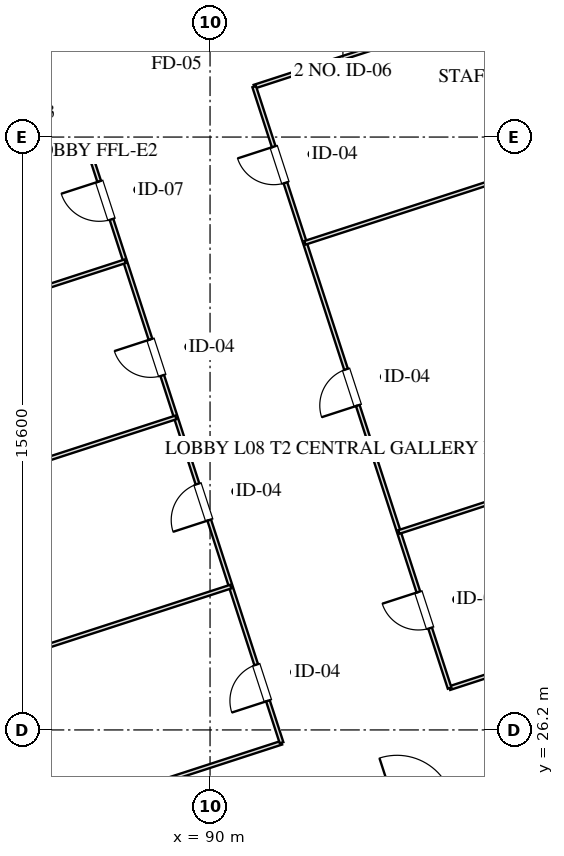
"""IFC4 building model, lengths in metres.
Left out: names, types, materials, properties, quantities, classifications, styles, units other than length and angle.
Written with IfcOpenShell. Run it as: python <this file> out.ifc"""

import sys

from ifc_helpers import new_model, si_unit, direction, frame, frame_2d, origin, place, context, subcontext, project, spatial, rectangle, extrude, element, fill, save


model = new_model("IFC4")
c1 = context("Model", 3, precision=1e-05, world=origin(), true_north=direction((0.0, 1.0)))
c2 = subcontext(c1, "Body", "Model", "MODEL_VIEW")
j1 = project(units=[si_unit("LENGTHUNIT", "METRE"), si_unit("PLANEANGLEUNIT", "RADIAN")], contexts=[c1])
p1 = place(None, origin())
s1 = spatial("IfcSite", under=j1, at=p1, CompositionType="ELEMENT")
p2 = place(p1, origin())
s2 = spatial("IfcBuilding", under=s1, at=p2, CompositionType="ELEMENT")
p3 = place(p2, frame((0.0, 0.0, 38.0)))
s3 = spatial("IfcBuildingStorey", under=s2, at=p3, CompositionType="ELEMENT", Elevation=38.0)
p4 = place(p3, frame((93.542, 23.585, 0.0), z_axis=(0.0, 0.0, 1.0), x_axis=(0.951063829732, 0.308994485023, 0.0)))
e1 = element("IfcWall", 1, at=p4, inside=s3, PredefinedType="PARTITIONING", context=c2, shape_type="SweptSolid", body=[
    extrude(rectangle(XDim=4.4, YDim=0.15, at=frame_2d((2.2, 0.0))), origin(), (0.0, 0.0, 1.0), 3.725),
])
p5 = place(p4, frame((1.45, 0.0, 0.0)))
e2 = element("IfcOpeningElement", 2, at=p5, cuts=e1, PredefinedType="OPENING", context=c2, shape_type="SweptSolid", body=[
    extrude(rectangle(XDim=1.5, YDim=2.05, at=frame_2d((0.75, 1.025))), frame((0.0, 0.085, 0.0), z_axis=(0.0, -1.0, 0.0), x_axis=(1.0, 0.0, 0.0)), (0.0, 0.0, 1.0), 0.17),
])
p6 = place(p3, frame((83.101, 43.324, 0.0), z_axis=(0.0, 0.0, 1.0), x_axis=(0.951052804469, 0.309028417967, 0.0)))
e3 = element("IfcWall", 3, at=p6, inside=s3, PredefinedType="PARTITIONING", context=c2, shape_type="SweptSolid", body=[
    extrude(rectangle(XDim=3.83, YDim=0.2, at=frame_2d((1.915, 0.0))), origin(), (0.0, 0.0, 1.0), 3.725),
])
p7 = place(p6, frame((1.35, 0.0, 0.0)))
e4 = element("IfcOpeningElement", 4, at=p7, cuts=e3, PredefinedType="OPENING", context=c2, shape_type="SweptSolid", body=[
    extrude(rectangle(XDim=1.2, YDim=2.05, at=frame_2d((0.6, 1.025))), frame((0.0, 0.11, 0.0), z_axis=(0.0, -1.0, 0.0), x_axis=(1.0, 0.0, 0.0)), (0.0, 0.0, 1.0), 0.22),
])
p8 = place(p3, frame((74.691, 20.278, 0.0), z_axis=(0.0, 0.0, 1.0), x_axis=(0.951053521786, 0.309026210375, 0.0)))
e5 = element("IfcWall", 5, at=p8, inside=s3, PredefinedType="MOVABLE", context=c2, shape_type="SweptSolid", body=[
    extrude(rectangle(XDim=18.075, YDim=0.1, at=frame_2d((9.038, 0.0))), origin(), (0.0, 0.0, 1.0), 3.725),
])
p9 = place(p3, frame((96.304, 27.3, 0.0), z_axis=(0.0, 0.0, 1.0), x_axis=(0.951055535739, 0.309020012199, 0.0)))
e6 = element("IfcWall", 6, at=p9, inside=s3, PredefinedType="MOVABLE", context=c2, shape_type="SweptSolid", body=[
    extrude(rectangle(XDim=14.875, YDim=0.1, at=frame_2d((7.438, 0.0))), origin(), (0.0, 0.0, 1.0), 3.725),
])
p10 = place(p3, frame((69.549, 36.103, 0.0), z_axis=(0.0, 0.0, 1.0), x_axis=(0.951057491432, 0.309013993197, 0.0)))
e7 = element("IfcWall", 7, at=p10, inside=s3, PredefinedType="MOVABLE", context=c2, shape_type="SweptSolid", body=[
    extrude(rectangle(XDim=18.075, YDim=0.1, at=frame_2d((9.038, 0.0))), origin(), (0.0, 0.0, 1.0), 3.725),
])
p11 = place(p3, frame((91.162, 43.126, 0.0), z_axis=(0.0, 0.0, 1.0), x_axis=(0.951055535739, 0.309020012199, 0.0)))
e8 = element("IfcWall", 8, at=p11, inside=s3, PredefinedType="MOVABLE", context=c2, shape_type="SweptSolid", body=[
    extrude(rectangle(XDim=14.875, YDim=0.1, at=frame_2d((7.438, 0.0))), origin(), (0.0, 0.0, 1.0), 3.725),
])
p12 = place(p3, frame((91.882, 25.863, 0.0), z_axis=(0.0, 0.0, 1.0), x_axis=(-0.309022042254, 0.951054876125, 0.0)))
e9 = element("IfcWall", 9, at=p12, inside=s3, PredefinedType="MOVABLE", context=c2, shape_type="SweptSolid", body=[
    extrude(rectangle(XDim=16.64, YDim=0.1, at=frame_2d((8.32, 0.0))), origin(), (0.0, 0.0, 1.0), 3.725),
])
p13 = place(p12, frame((1.16, 0.0, 0.0)))
e10 = element("IfcOpeningElement", 10, at=p13, cuts=e9, PredefinedType="OPENING", context=c2, shape_type="SweptSolid", body=[
    extrude(rectangle(XDim=1.0, YDim=2.05, at=frame_2d((0.5, 1.025))), frame((0.0, 0.06, 0.0), z_axis=(0.0, -1.0, 0.0), x_axis=(1.0, 0.0, 0.0)), (0.0, 0.0, 1.0), 0.12),
])
p14 = place(p12, frame((6.16, 0.0, 0.0)))
e11 = element("IfcOpeningElement", 11, at=p14, cuts=e9, PredefinedType="OPENING", context=c2, shape_type="SweptSolid", body=[
    extrude(rectangle(XDim=1.0, YDim=2.05, at=frame_2d((0.5, 1.025))), frame((0.0, 0.06, 0.0), z_axis=(0.0, -1.0, 0.0), x_axis=(1.0, 0.0, 0.0)), (0.0, 0.0, 1.0), 0.12),
])
p15 = place(p12, frame((10.16, 0.0, 0.0)))
e12 = element("IfcOpeningElement", 12, at=p15, cuts=e9, PredefinedType="OPENING", context=c2, shape_type="SweptSolid", body=[
    extrude(rectangle(XDim=1.0, YDim=2.05, at=frame_2d((0.5, 1.025))), frame((0.0, 0.06, 0.0), z_axis=(0.0, -1.0, 0.0), x_axis=(1.0, 0.0, 0.0)), (0.0, 0.0, 1.0), 0.12),
])
p16 = place(p12, frame((14.48, 0.0, 0.0)))
e13 = element("IfcOpeningElement", 13, at=p16, cuts=e9, PredefinedType="OPENING", context=c2, shape_type="SweptSolid", body=[
    extrude(rectangle(XDim=1.05, YDim=2.05, at=frame_2d((0.525, 1.025))), frame((0.0, 0.06, 0.0), z_axis=(0.0, -1.0, 0.0), x_axis=(1.0, 0.0, 0.0)), (0.0, 0.0, 1.0), 0.12),
])
p17 = place(p3, frame((96.304, 27.3, 0.0), z_axis=(0.0, 0.0, 1.0), x_axis=(-0.30901773025, 0.951056277195, 0.0)))
e14 = element("IfcWall", 14, at=p17, inside=s3, PredefinedType="MOVABLE", context=c2, shape_type="SweptSolid", body=[
    extrude(rectangle(XDim=16.64, YDim=0.1, at=frame_2d((8.32, 0.0))), origin(), (0.0, 0.0, 1.0), 3.725),
])
p18 = place(p17, frame((1.66, 0.0, 0.0)))
e15 = element("IfcOpeningElement", 15, at=p18, cuts=e14, PredefinedType="OPENING", context=c2, shape_type="SweptSolid", body=[
    extrude(rectangle(XDim=1.0, YDim=2.05, at=frame_2d((0.5, 1.025))), frame((0.0, 0.06, 0.0), z_axis=(0.0, -1.0, 0.0), x_axis=(1.0, 0.0, 0.0)), (0.0, 0.0, 1.0), 0.12),
])
p19 = place(p17, frame((7.82, 0.0, 0.0)))
e16 = element("IfcOpeningElement", 16, at=p19, cuts=e14, PredefinedType="OPENING", context=c2, shape_type="SweptSolid", body=[
    extrude(rectangle(XDim=1.0, YDim=2.05, at=frame_2d((0.5, 1.025))), frame((0.0, 0.06, 0.0), z_axis=(0.0, -1.0, 0.0), x_axis=(1.0, 0.0, 0.0)), (0.0, 0.0, 1.0), 0.12),
])
p20 = place(p17, frame((13.98, 0.0, 0.0)))
e17 = element("IfcOpeningElement", 17, at=p20, cuts=e14, PredefinedType="OPENING", context=c2, shape_type="SweptSolid", body=[
    extrude(rectangle(XDim=1.0, YDim=2.05, at=frame_2d((0.5, 1.025))), frame((0.0, 0.06, 0.0), z_axis=(0.0, -1.0, 0.0), x_axis=(1.0, 0.0, 0.0)), (0.0, 0.0, 1.0), 0.12),
])
for number, where, z_axis, x_axis in (
    (18, (73.356, 24.386, 0.0), (0.0, 0.0, 1.0), (0.951, 0.309, 0.0)),
    (19, (71.91, 28.837, 0.0), (0.0, 0.0, 1.0), (0.951, 0.309, 0.0)),
    (20, (70.575, 32.946, 0.0), (0.0, 0.0, 1.0), (0.951, 0.309, 0.0)),
):
    element("IfcWall", number, at=place(p3, frame(where, z_axis=z_axis, x_axis=x_axis)), inside=s3, PredefinedType="MOVABLE", context=c2, shape_type="SweptSolid", body=[
        extrude(rectangle(XDim=18.075, YDim=0.1, at=frame_2d((9.038, 0.0))), origin(), (0.0, 0.0, 1.0), 3.725),
    ])
for number, where, z_axis, x_axis in (
    (21, (94.969, 31.409, 0.0), (0.0, 0.0, 1.0), (0.951, 0.309, 0.0)),
    (22, (92.497, 39.017, 0.0), (0.0, 0.0, 1.0), (0.951, 0.309, 0.0)),
):
    element("IfcWall", number, at=place(p3, frame(where, z_axis=z_axis, x_axis=x_axis)), inside=s3, PredefinedType="MOVABLE", context=c2, shape_type="SweptSolid", body=[
        extrude(rectangle(XDim=14.875, YDim=0.1, at=frame_2d((7.438, 0.0))), origin(), (0.0, 0.0, 1.0), 3.725),
    ])
p21 = place(p13, origin())
e23 = element("IfcDoor", 23, at=p21, inside=s3, OperationType="SINGLE_SWING_LEFT", PredefinedType="DOOR", context=c2, shape_type="SweptSolid", body=[
    extrude(rectangle(XDim=1.0, YDim=2.05, at=frame_2d((0.5, 1.025))), frame((0.0, 0.025, 0.0), z_axis=(0.0, -1.0, 0.0), x_axis=(1.0, 0.0, 0.0)), (0.0, 0.0, 1.0), 0.05),
])
fill(e10, e23)
p22 = place(p14, origin())
e24 = element("IfcDoor", 24, at=p22, inside=s3, OperationType="SINGLE_SWING_LEFT", PredefinedType="DOOR", context=c2, shape_type="SweptSolid", body=[
    extrude(rectangle(XDim=1.0, YDim=2.05, at=frame_2d((0.5, 1.025))), frame((0.0, 0.025, 0.0), z_axis=(0.0, -1.0, 0.0), x_axis=(1.0, 0.0, 0.0)), (0.0, 0.0, 1.0), 0.05),
])
fill(e11, e24)
p23 = place(p15, origin())
e25 = element("IfcDoor", 25, at=p23, inside=s3, OperationType="SINGLE_SWING_RIGHT", PredefinedType="DOOR", context=c2, shape_type="SweptSolid", body=[
    extrude(rectangle(XDim=1.0, YDim=2.05, at=frame_2d((0.5, 1.025))), frame((0.0, 0.025, 0.0), z_axis=(0.0, -1.0, 0.0), x_axis=(1.0, 0.0, 0.0)), (0.0, 0.0, 1.0), 0.05),
])
fill(e12, e25)
p24 = place(p16, origin())
e26 = element("IfcDoor", 26, at=p24, inside=s3, OperationType="SINGLE_SWING_RIGHT", PredefinedType="DOOR", context=c2, shape_type="SweptSolid", body=[
    extrude(rectangle(XDim=1.05, YDim=2.05, at=frame_2d((0.525, 1.025))), frame((0.0, 0.025, 0.0), z_axis=(0.0, -1.0, 0.0), x_axis=(1.0, 0.0, 0.0)), (0.0, 0.0, 1.0), 0.05),
])
fill(e13, e26)
p25 = place(p18, origin())
e27 = element("IfcDoor", 27, at=p25, inside=s3, OperationType="SINGLE_SWING_RIGHT", PredefinedType="DOOR", context=c2, shape_type="SweptSolid", body=[
    extrude(rectangle(XDim=1.0, YDim=2.05, at=frame_2d((0.5, 1.025))), frame((0.0, 0.025, 0.0), z_axis=(0.0, -1.0, 0.0), x_axis=(1.0, 0.0, 0.0)), (0.0, 0.0, 1.0), 0.05),
])
fill(e15, e27)
p26 = place(p19, origin())
e28 = element("IfcDoor", 28, at=p26, inside=s3, OperationType="SINGLE_SWING_LEFT", PredefinedType="DOOR", context=c2, shape_type="SweptSolid", body=[
    extrude(rectangle(XDim=1.0, YDim=2.05, at=frame_2d((0.5, 1.025))), frame((0.0, 0.025, 0.0), z_axis=(0.0, -1.0, 0.0), x_axis=(1.0, 0.0, 0.0)), (0.0, 0.0, 1.0), 0.05),
])
fill(e16, e28)
p27 = place(p20, origin())
e29 = element("IfcDoor", 29, at=p27, inside=s3, OperationType="SINGLE_SWING_RIGHT", PredefinedType="DOOR", context=c2, shape_type="SweptSolid", body=[
    extrude(rectangle(XDim=1.0, YDim=2.05, at=frame_2d((0.5, 1.025))), frame((0.0, 0.025, 0.0), z_axis=(0.0, -1.0, 0.0), x_axis=(1.0, 0.0, 0.0)), (0.0, 0.0, 1.0), 0.05),
])
fill(e17, e29)
save(model, sys.argv[1])
